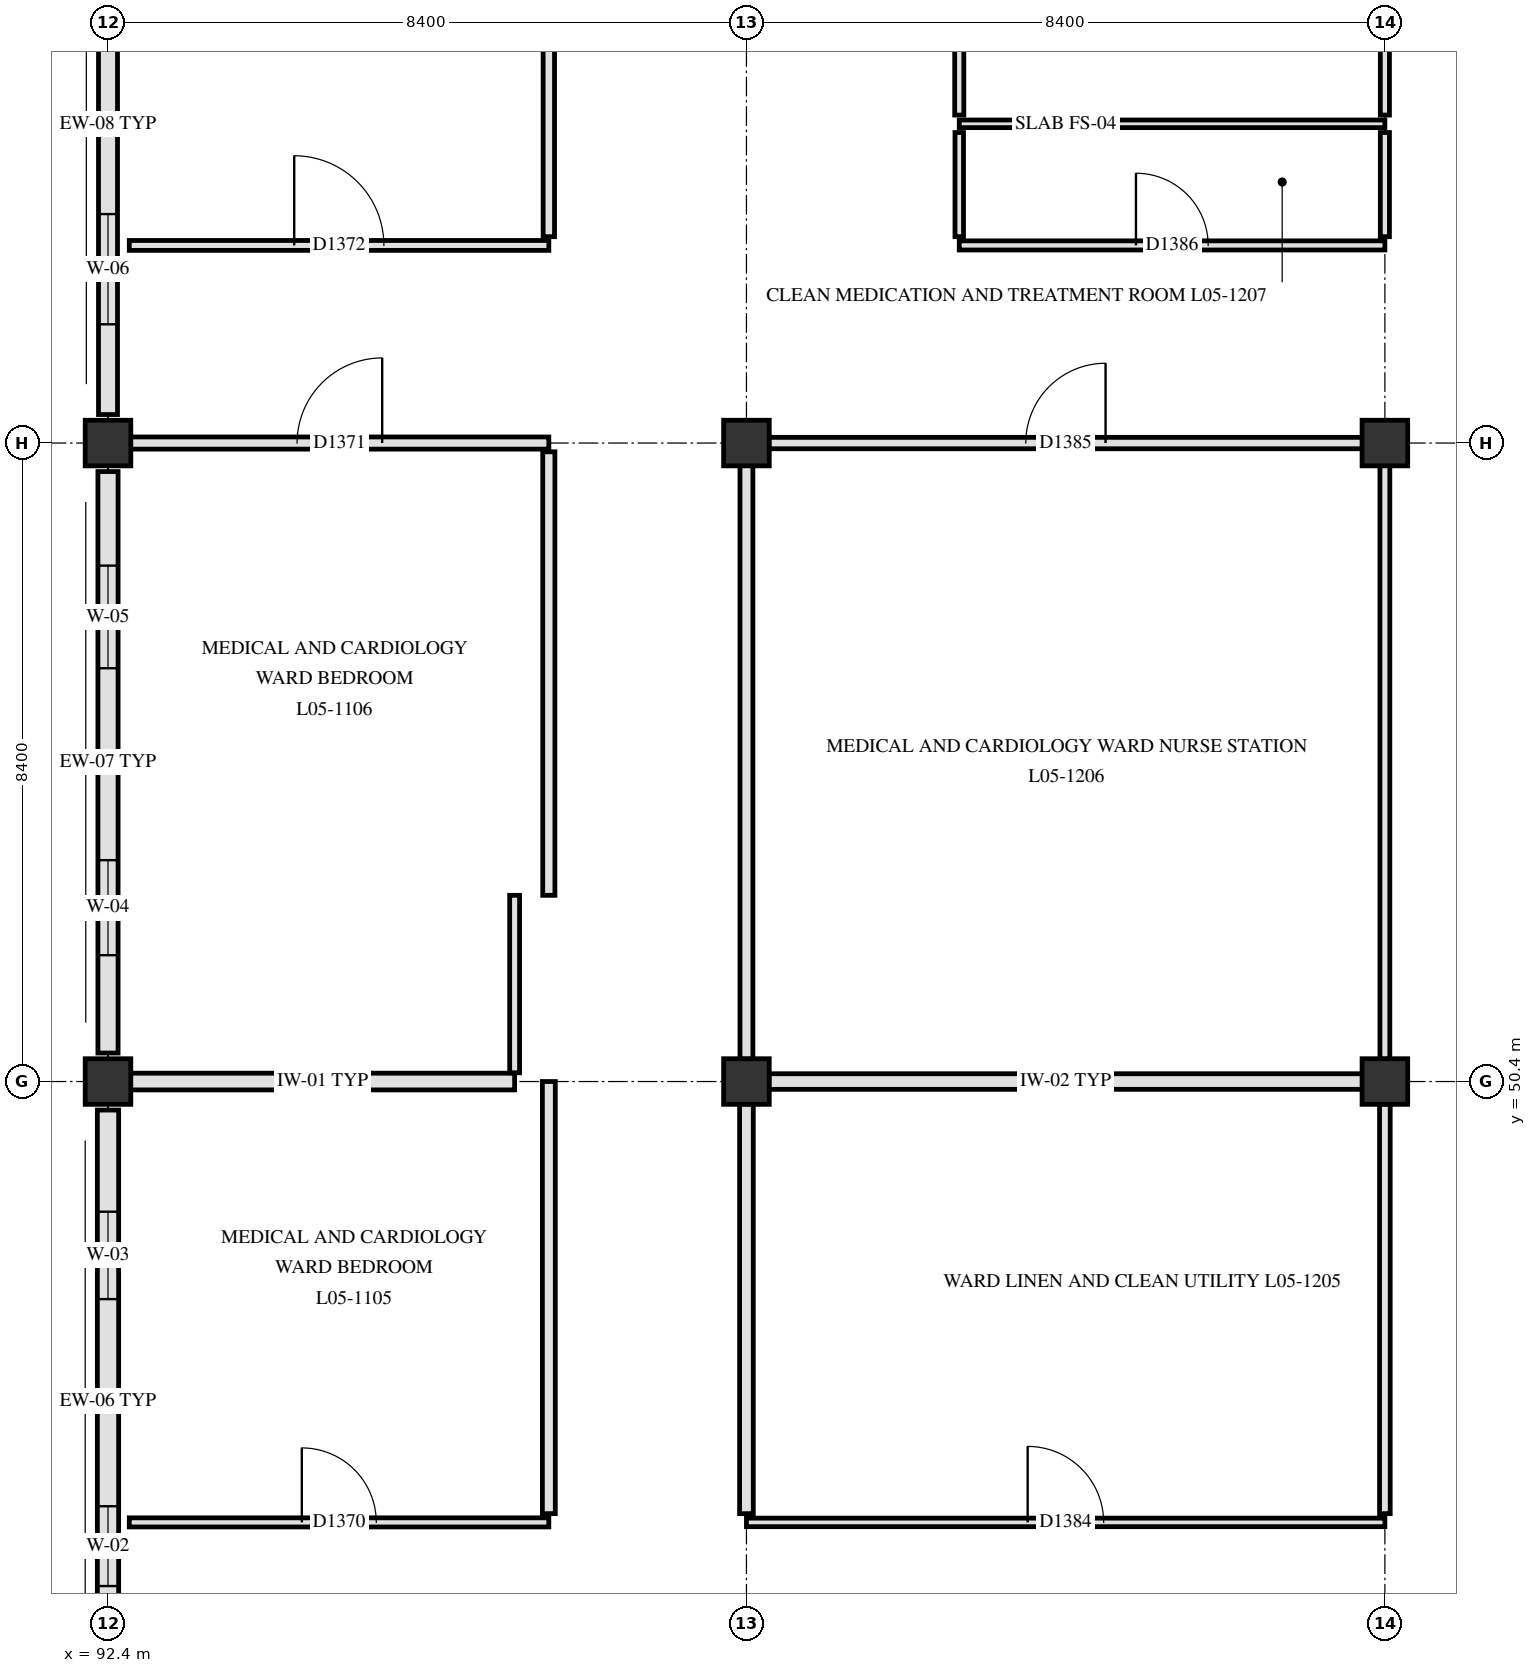
"""IFC4 building model, lengths in metres.
Left out: names, types, materials, properties, quantities, classifications, styles, units other than length and angle.
Written with IfcOpenShell. Run it as: python <this file> out.ifc"""

import sys

from ifc_helpers import new_model, si_unit, direction, frame, frame_2d, origin, origin_2d, place, context, subcontext, project, spatial, rectangle, extrude, element, fill, save


model = new_model("IFC4")
c1 = context("Model", 3, precision=1e-05, world=origin(), true_north=direction((0.0, 1.0)))
c2 = subcontext(c1, "Body", "Model", "MODEL_VIEW")
j1 = project(units=[si_unit("LENGTHUNIT", "METRE"), si_unit("PLANEANGLEUNIT", "RADIAN")], contexts=[c1])
p1 = place(None, origin())
s1 = spatial("IfcSite", under=j1, at=p1, CompositionType="ELEMENT")
p2 = place(p1, origin())
s2 = spatial("IfcBuilding", under=s1, at=p2, CompositionType="ELEMENT")
p3 = place(p2, frame((0.0, 0.0, 22.5)))
s3 = spatial("IfcBuildingStorey", under=s2, at=p3, CompositionType="ELEMENT", Elevation=22.5)
for number, where, z_axis, x_axis in (
    (1, (92.4, 50.4, 0.0), (0.0, 0.0, 1.0), (1.0, 0.0, 0.0)),
    (2, (92.4, 58.8, 0.0), (0.0, 0.0, 1.0), (1.0, 0.0, 0.0)),
    (3, (100.8, 50.4, 0.0), (0.0, 0.0, 1.0), (1.0, 0.0, 0.0)),
    (4, (100.8, 58.8, 0.0), (0.0, 0.0, 1.0), (1.0, 0.0, 0.0)),
    (5, (109.2, 50.4, 0.0), (0.0, 0.0, 1.0), (1.0, 0.0, 0.0)),
    (6, (109.2, 58.8, 0.0), (0.0, 0.0, 1.0), (1.0, 0.0, 0.0)),
):
    element("IfcColumn", number, at=place(p3, frame(where, z_axis=z_axis, x_axis=x_axis)), inside=s3, PredefinedType="COLUMN", context=c2, shape_type="SweptSolid", body=[
        extrude(rectangle(XDim=0.6, YDim=0.6, at=origin_2d()), origin(), (0.0, 0.0, 1.0), 3.9),
    ])
p4 = place(p3, frame((92.4, 42.375, 0.0), z_axis=(0.0, 0.0, 1.0), x_axis=(0.0, 1.0, 0.0)))
e7 = element("IfcWall", 7, at=p4, inside=s3, PredefinedType="SOLIDWALL", context=c2, shape_type="SweptSolid", body=[
    extrude(rectangle(XDim=7.65, YDim=0.28, at=frame_2d((3.825, 0.0))), origin(), (0.0, 0.0, 1.0), 3.34),
])
p5 = place(p4, frame((1.387, 0.0, 0.85)))
e8 = element("IfcOpeningElement", 8, at=p5, cuts=e7, PredefinedType="OPENING", context=c2, shape_type="SweptSolid", body=[
    extrude(rectangle(XDim=1.05, YDim=1.3, at=frame_2d((0.525, 0.65))), frame((0.0, 0.15, 0.0), z_axis=(0.0, -1.0, 0.0), x_axis=(1.0, 0.0, 0.0)), (0.0, 0.0, 1.0), 0.3),
])
p6 = place(p4, frame((5.163, 0.0, 0.85)))
e9 = element("IfcOpeningElement", 9, at=p6, cuts=e7, PredefinedType="OPENING", context=c2, shape_type="SweptSolid", body=[
    extrude(rectangle(XDim=1.15, YDim=1.3, at=frame_2d((0.575, 0.65))), frame((0.0, 0.15, 0.0), z_axis=(0.0, -1.0, 0.0), x_axis=(1.0, 0.0, 0.0)), (0.0, 0.0, 1.0), 0.3),
])
p7 = place(p3, frame((92.4, 50.775, 0.0), z_axis=(0.0, 0.0, 1.0), x_axis=(0.0, 1.0, 0.0)))
e10 = element("IfcWall", 10, at=p7, inside=s3, PredefinedType="SOLIDWALL", context=c2, shape_type="SweptSolid", body=[
    extrude(rectangle(XDim=7.65, YDim=0.265, at=frame_2d((3.825, 0.0))), origin(), (0.0, 0.0, 1.0), 3.38),
])
p8 = place(p7, frame((1.288, 0.0, 0.85)))
e11 = element("IfcOpeningElement", 11, at=p8, cuts=e10, PredefinedType="OPENING", context=c2, shape_type="SweptSolid", body=[
    extrude(rectangle(XDim=1.25, YDim=1.3, at=frame_2d((0.625, 0.65))), frame((0.0, 0.142, 0.0), z_axis=(0.0, -1.0, 0.0), x_axis=(1.0, 0.0, 0.0)), (0.0, 0.0, 1.0), 0.285),
])
p9 = place(p7, frame((5.062, 0.0, 0.85)))
e12 = element("IfcOpeningElement", 12, at=p9, cuts=e10, PredefinedType="OPENING", context=c2, shape_type="SweptSolid", body=[
    extrude(rectangle(XDim=1.35, YDim=1.3, at=frame_2d((0.675, 0.65))), frame((0.0, 0.142, 0.0), z_axis=(0.0, -1.0, 0.0), x_axis=(1.0, 0.0, 0.0)), (0.0, 0.0, 1.0), 0.285),
])
p10 = place(p3, frame((92.4, 59.175, 0.0), z_axis=(0.0, 0.0, 1.0), x_axis=(0.0, 1.0, 0.0)))
e13 = element("IfcWall", 13, at=p10, inside=s3, PredefinedType="SOLIDWALL", context=c2, shape_type="SweptSolid", body=[
    extrude(rectangle(XDim=7.65, YDim=0.25, at=frame_2d((3.825, 0.0))), origin(), (0.0, 0.0, 1.0), 3.38),
])
p11 = place(p10, frame((1.188, 0.0, 0.85)))
e14 = element("IfcOpeningElement", 14, at=p11, cuts=e13, PredefinedType="OPENING", context=c2, shape_type="SweptSolid", body=[
    extrude(rectangle(XDim=1.45, YDim=1.3, at=frame_2d((0.725, 0.65))), frame((0.0, 0.135, 0.0), z_axis=(0.0, -1.0, 0.0), x_axis=(1.0, 0.0, 0.0)), (0.0, 0.0, 1.0), 0.27),
])
p12 = place(p10, frame((4.962, 0.0, 0.85)))
e15 = element("IfcOpeningElement", 15, at=p12, cuts=e13, PredefinedType="OPENING", context=c2, shape_type="SweptSolid", body=[
    extrude(rectangle(XDim=1.55, YDim=1.3, at=frame_2d((0.775, 0.65))), frame((0.0, 0.135, 0.0), z_axis=(0.0, -1.0, 0.0), x_axis=(1.0, 0.0, 0.0)), (0.0, 0.0, 1.0), 0.27),
])
p13 = place(p3, frame((92.68, 44.6, 0.0), z_axis=(0.0, 0.0, 1.0), x_axis=(1.0, 0.0, 0.0)))
e16 = element("IfcWall", 16, at=p13, inside=s3, PredefinedType="PARTITIONING", context=c2, shape_type="SweptSolid", body=[
    extrude(rectangle(XDim=5.52, YDim=0.12, at=frame_2d((2.76, 0.0))), origin(), (0.0, 0.0, 1.0), 3.61),
])
p14 = place(p13, frame((2.27, 0.0, 0.0)))
e17 = element("IfcOpeningElement", 17, at=p14, cuts=e16, PredefinedType="OPENING", context=c2, shape_type="SweptSolid", body=[
    extrude(rectangle(XDim=0.98, YDim=2.12, at=frame_2d((0.49, 1.06))), frame((0.0, 0.07, 0.0), z_axis=(0.0, -1.0, 0.0), x_axis=(1.0, 0.0, 0.0)), (0.0, 0.0, 1.0), 0.14),
])
p15 = place(p3, frame((100.8, 44.6, 0.0), z_axis=(0.0, 0.0, 1.0), x_axis=(1.0, 0.0, 0.0)))
e18 = element("IfcWall", 18, at=p15, inside=s3, PredefinedType="PARTITIONING", context=c2, shape_type="SweptSolid", body=[
    extrude(rectangle(XDim=8.4, YDim=0.112, at=frame_2d((4.2, 0.0))), origin(), (0.0, 0.0, 1.0), 3.3),
])
p16 = place(p15, frame((3.7, 0.0, 0.0)))
e19 = element("IfcOpeningElement", 19, at=p16, cuts=e18, PredefinedType="OPENING", context=c2, shape_type="SweptSolid", body=[
    extrude(rectangle(XDim=1.0, YDim=2.15, at=frame_2d((0.5, 1.075))), frame((0.0, 0.066, 0.0), z_axis=(0.0, -1.0, 0.0), x_axis=(1.0, 0.0, 0.0)), (0.0, 0.0, 1.0), 0.132),
])
p17 = place(p3, frame((92.695, 50.4, 0.0), z_axis=(0.0, 0.0, 1.0), x_axis=(1.0, 0.0, 0.0)))
e20 = element("IfcWall", 20, at=p17, inside=s3, PredefinedType="PARTITIONING", context=c2, shape_type="SweptSolid", body=[
    extrude(rectangle(XDim=5.055, YDim=0.22, at=frame_2d((2.527, 0.0))), origin(), (0.0, 0.0, 1.0), 3.16),
])
p18 = place(p3, frame((101.095, 50.4, 0.0), z_axis=(0.0, 0.0, 1.0), x_axis=(1.0, 0.0, 0.0)))
e21 = element("IfcWall", 21, at=p18, inside=s3, PredefinedType="PARTITIONING", context=c2, shape_type="SweptSolid", body=[
    extrude(rectangle(XDim=7.81, YDim=0.205, at=frame_2d((3.905, 0.0))), origin(), (0.0, 0.0, 1.0), 3.16),
])
p19 = place(p3, frame((92.695, 58.8, 0.0), z_axis=(0.0, 0.0, 1.0), x_axis=(1.0, 0.0, 0.0)))
e22 = element("IfcWall", 22, at=p19, inside=s3, PredefinedType="PARTITIONING", context=c2, shape_type="SweptSolid", body=[
    extrude(rectangle(XDim=5.505, YDim=0.16, at=frame_2d((2.752, 0.0))), origin(), (0.0, 0.0, 1.0), 3.16),
])
p20 = place(p19, frame((2.192, 0.0, 0.0)))
e23 = element("IfcOpeningElement", 23, at=p20, cuts=e22, PredefinedType="OPENING", context=c2, shape_type="SweptSolid", body=[
    extrude(rectangle(XDim=1.12, YDim=2.18, at=frame_2d((0.56, 1.09))), frame((0.0, 0.09, 0.0), z_axis=(0.0, -1.0, 0.0), x_axis=(1.0, 0.0, 0.0)), (0.0, 0.0, 1.0), 0.18),
])
p21 = place(p3, frame((101.095, 58.8, 0.0), z_axis=(0.0, 0.0, 1.0), x_axis=(1.0, 0.0, 0.0)))
e24 = element("IfcWall", 24, at=p21, inside=s3, PredefinedType="PARTITIONING", context=c2, shape_type="SweptSolid", body=[
    extrude(rectangle(XDim=7.81, YDim=0.15, at=frame_2d((3.905, 0.0))), origin(), (0.0, 0.0, 1.0), 3.16),
])
p22 = place(p21, frame((3.38, 0.0, 0.0)))
e25 = element("IfcOpeningElement", 25, at=p22, cuts=e24, PredefinedType="OPENING", context=c2, shape_type="SweptSolid", body=[
    extrude(rectangle(XDim=1.05, YDim=2.15, at=frame_2d((0.525, 1.075))), frame((0.0, 0.085, 0.0), z_axis=(0.0, -1.0, 0.0), x_axis=(1.0, 0.0, 0.0)), (0.0, 0.0, 1.0), 0.17),
])
p23 = place(p3, frame((92.68, 61.4, 0.0), z_axis=(0.0, 0.0, 1.0), x_axis=(1.0, 0.0, 0.0)))
e26 = element("IfcWall", 26, at=p23, inside=s3, PredefinedType="PARTITIONING", context=c2, shape_type="SweptSolid", body=[
    extrude(rectangle(XDim=5.52, YDim=0.13, at=frame_2d((2.76, 0.0))), origin(), (0.0, 0.0, 1.0), 3.61),
])
p24 = place(p23, frame((2.17, 0.0, 0.0)))
e27 = element("IfcOpeningElement", 27, at=p24, cuts=e26, PredefinedType="OPENING", context=c2, shape_type="SweptSolid", body=[
    extrude(rectangle(XDim=1.18, YDim=2.18, at=frame_2d((0.59, 1.09))), frame((0.0, 0.075, 0.0), z_axis=(0.0, -1.0, 0.0), x_axis=(1.0, 0.0, 0.0)), (0.0, 0.0, 1.0), 0.15),
])
p25 = place(p3, frame((103.6, 61.4, 0.0), z_axis=(0.0, 0.0, 1.0), x_axis=(1.0, 0.0, 0.0)))
e28 = element("IfcWall", 28, at=p25, inside=s3, PredefinedType="PARTITIONING", context=c2, shape_type="SweptSolid", body=[
    extrude(rectangle(XDim=5.6, YDim=0.12, at=frame_2d((2.8, 0.0))), origin(), (0.0, 0.0, 1.0), 3.3),
])
p26 = place(p25, frame((2.325, 0.0, 0.0)))
e29 = element("IfcOpeningElement", 29, at=p26, cuts=e28, PredefinedType="OPENING", context=c2, shape_type="SweptSolid", body=[
    extrude(rectangle(XDim=0.95, YDim=2.1, at=frame_2d((0.475, 1.05))), frame((0.0, 0.07, 0.0), z_axis=(0.0, -1.0, 0.0), x_axis=(1.0, 0.0, 0.0)), (0.0, 0.0, 1.0), 0.14),
])
p27 = place(p3, frame((103.6, 63.0, 0.0), z_axis=(0.0, 0.0, 1.0), x_axis=(1.0, 0.0, 0.0)))
e30 = element("IfcWall", 30, at=p27, inside=s3, PredefinedType="PARTITIONING", context=c2, shape_type="SweptSolid", body=[
    extrude(rectangle(XDim=5.6, YDim=0.1, at=frame_2d((2.8, 0.0))), origin(), (0.0, 0.0, 1.0), 3.3),
])
p28 = place(p3, frame((97.75, 50.515, 0.0), z_axis=(0.0, 0.0, 1.0), x_axis=(0.0, 1.0, 0.0)))
e31 = element("IfcWall", 31, at=p28, inside=s3, PredefinedType="PARTITIONING", context=c2, shape_type="SweptSolid", body=[
    extrude(rectangle(XDim=2.335, YDim=0.13, at=frame_2d((1.167, 0.0))), origin(), (0.0, 0.0, 1.0), 3.61),
])
p29 = place(p3, frame((98.2, 44.715, 0.0), z_axis=(0.0, 0.0, 1.0), x_axis=(0.0, 1.0, 0.0)))
e32 = element("IfcWall", 32, at=p29, inside=s3, PredefinedType="PARTITIONING", context=c2, shape_type="SweptSolid", body=[
    extrude(rectangle(XDim=5.685, YDim=0.17, at=frame_2d((2.842, 0.0))), origin(), (0.0, 0.0, 1.0), 3.16),
])
p30 = place(p3, frame((98.2, 52.85, 0.0), z_axis=(0.0, 0.0, 1.0), x_axis=(0.0, 1.0, 0.0)))
e33 = element("IfcWall", 33, at=p30, inside=s3, PredefinedType="PARTITIONING", context=c2, shape_type="SweptSolid", body=[
    extrude(rectangle(XDim=5.835, YDim=0.16, at=frame_2d((2.917, 0.0))), origin(), (0.0, 0.0, 1.0), 3.34),
])
p31 = place(p3, frame((98.2, 61.515, 0.0), z_axis=(0.0, 0.0, 1.0), x_axis=(0.0, 1.0, 0.0)))
e34 = element("IfcWall", 34, at=p31, inside=s3, PredefinedType="PARTITIONING", context=c2, shape_type="SweptSolid", body=[
    extrude(rectangle(XDim=5.685, YDim=0.15, at=frame_2d((2.843, 0.0))), origin(), (0.0, 0.0, 1.0), 3.16),
])
p32 = place(p3, frame((100.8, 44.715, 0.0), z_axis=(0.0, 0.0, 1.0), x_axis=(0.0, 1.0, 0.0)))
e35 = element("IfcWall", 35, at=p32, inside=s3, PredefinedType="PARTITIONING", context=c2, shape_type="SweptSolid", body=[
    extrude(rectangle(XDim=5.39, YDim=0.18, at=frame_2d((2.695, 0.0))), origin(), (0.0, 0.0, 1.0), 3.3),
])
p33 = place(p3, frame((100.8, 50.695, 0.0), z_axis=(0.0, 0.0, 1.0), x_axis=(0.0, 1.0, 0.0)))
e36 = element("IfcWall", 36, at=p33, inside=s3, PredefinedType="PARTITIONING", context=c2, shape_type="SweptSolid", body=[
    extrude(rectangle(XDim=7.81, YDim=0.17, at=frame_2d((3.905, 0.0))), origin(), (0.0, 0.0, 1.0), 3.3),
])
p34 = place(p3, frame((103.6, 61.515, 0.0), z_axis=(0.0, 0.0, 1.0), x_axis=(0.0, 1.0, 0.0)))
e37 = element("IfcWall", 37, at=p34, inside=s3, PredefinedType="PARTITIONING", context=c2, shape_type="SweptSolid", body=[
    extrude(rectangle(XDim=1.37, YDim=0.112, at=frame_2d((0.685, 0.0))), origin(), (0.0, 0.0, 1.0), 3.34),
])
p35 = place(p3, frame((103.6, 63.115, 0.0), z_axis=(0.0, 0.0, 1.0), x_axis=(0.0, 1.0, 0.0)))
e38 = element("IfcWall", 38, at=p35, inside=s3, PredefinedType="PARTITIONING", context=c2, shape_type="SweptSolid", body=[
    extrude(rectangle(XDim=3.97, YDim=0.12, at=frame_2d((1.985, 0.0))), origin(), (0.0, 0.0, 1.0), 3.34),
])
p36 = place(p35, frame((1.51, 0.0, 0.0)))
e39 = element("IfcOpeningElement", 39, at=p36, cuts=e38, PredefinedType="OPENING", context=c2, shape_type="SweptSolid", body=[
    extrude(rectangle(XDim=0.95, YDim=2.1, at=frame_2d((0.475, 1.05))), frame((0.0, 0.07, 0.0), z_axis=(0.0, -1.0, 0.0), x_axis=(1.0, 0.0, 0.0)), (0.0, 0.0, 1.0), 0.14),
])
p37 = place(p3, frame((109.2, 44.715, 0.0), z_axis=(0.0, 0.0, 1.0), x_axis=(0.0, 1.0, 0.0)))
e40 = element("IfcWall", 40, at=p37, inside=s3, PredefinedType="PARTITIONING", context=c2, shape_type="SweptSolid", body=[
    extrude(rectangle(XDim=5.39, YDim=0.14, at=frame_2d((2.695, 0.0))), origin(), (0.0, 0.0, 1.0), 3.3),
])
p38 = place(p3, frame((109.2, 50.695, 0.0), z_axis=(0.0, 0.0, 1.0), x_axis=(0.0, 1.0, 0.0)))
e41 = element("IfcWall", 41, at=p38, inside=s3, PredefinedType="PARTITIONING", context=c2, shape_type="SweptSolid", body=[
    extrude(rectangle(XDim=7.81, YDim=0.13, at=frame_2d((3.905, 0.0))), origin(), (0.0, 0.0, 1.0), 3.3),
])
p39 = place(p3, frame((109.2, 61.515, 0.0), z_axis=(0.0, 0.0, 1.0), x_axis=(0.0, 1.0, 0.0)))
e42 = element("IfcWall", 42, at=p39, inside=s3, PredefinedType="PARTITIONING", context=c2, shape_type="SweptSolid", body=[
    extrude(rectangle(XDim=1.37, YDim=0.12, at=frame_2d((0.685, 0.0))), origin(), (0.0, 0.0, 1.0), 3.3),
])
p40 = place(p3, frame((109.2, 63.115, 0.0), z_axis=(0.0, 0.0, 1.0), x_axis=(0.0, 1.0, 0.0)))
e43 = element("IfcWall", 43, at=p40, inside=s3, PredefinedType="PARTITIONING", context=c2, shape_type="SweptSolid", body=[
    extrude(rectangle(XDim=3.79, YDim=0.12, at=frame_2d((1.895, 0.0))), origin(), (0.0, 0.0, 1.0), 3.3),
])
p41 = place(p5, origin())
e44 = element("IfcWindow", 44, at=p41, inside=s3, PartitioningType="SINGLE_PANEL", PredefinedType="WINDOW", context=c2, shape_type="SweptSolid", body=[
    extrude(rectangle(XDim=1.05, YDim=1.3, at=frame_2d((0.525, 0.65))), frame((0.0, 0.03, 0.0), z_axis=(0.0, -1.0, 0.0), x_axis=(1.0, 0.0, 0.0)), (0.0, 0.0, 1.0), 0.06),
])
fill(e8, e44)
p42 = place(p6, origin())
e45 = element("IfcWindow", 45, at=p42, inside=s3, PartitioningType="SINGLE_PANEL", PredefinedType="WINDOW", context=c2, shape_type="SweptSolid", body=[
    extrude(rectangle(XDim=1.15, YDim=1.3, at=frame_2d((0.575, 0.65))), frame((0.0, 0.03, 0.0), z_axis=(0.0, -1.0, 0.0), x_axis=(1.0, 0.0, 0.0)), (0.0, 0.0, 1.0), 0.06),
])
fill(e9, e45)
p43 = place(p8, origin())
e46 = element("IfcWindow", 46, at=p43, inside=s3, PartitioningType="SINGLE_PANEL", PredefinedType="WINDOW", context=c2, shape_type="SweptSolid", body=[
    extrude(rectangle(XDim=1.25, YDim=1.3, at=frame_2d((0.625, 0.65))), frame((0.0, 0.03, 0.0), z_axis=(0.0, -1.0, 0.0), x_axis=(1.0, 0.0, 0.0)), (0.0, 0.0, 1.0), 0.06),
])
fill(e11, e46)
p44 = place(p9, origin())
e47 = element("IfcWindow", 47, at=p44, inside=s3, PartitioningType="SINGLE_PANEL", PredefinedType="WINDOW", context=c2, shape_type="SweptSolid", body=[
    extrude(rectangle(XDim=1.35, YDim=1.3, at=frame_2d((0.675, 0.65))), frame((0.0, 0.03, 0.0), z_axis=(0.0, -1.0, 0.0), x_axis=(1.0, 0.0, 0.0)), (0.0, 0.0, 1.0), 0.06),
])
fill(e12, e47)
p45 = place(p11, origin())
e48 = element("IfcWindow", 48, at=p45, inside=s3, PartitioningType="SINGLE_PANEL", PredefinedType="WINDOW", context=c2, shape_type="SweptSolid", body=[
    extrude(rectangle(XDim=1.45, YDim=1.3, at=frame_2d((0.725, 0.65))), frame((0.0, 0.03, 0.0), z_axis=(0.0, -1.0, 0.0), x_axis=(1.0, 0.0, 0.0)), (0.0, 0.0, 1.0), 0.06),
])
fill(e14, e48)
p46 = place(p14, origin())
e49 = element("IfcDoor", 49, at=p46, inside=s3, OperationType="SINGLE_SWING_LEFT", PredefinedType="DOOR", context=c2, shape_type="SweptSolid", body=[
    extrude(rectangle(XDim=0.98, YDim=2.12, at=frame_2d((0.49, 1.06))), frame((0.0, 0.025, 0.0), z_axis=(0.0, -1.0, 0.0), x_axis=(1.0, 0.0, 0.0)), (0.0, 0.0, 1.0), 0.05),
])
fill(e17, e49)
p47 = place(p20, origin())
e50 = element("IfcDoor", 50, at=p47, inside=s3, OperationType="SINGLE_SWING_RIGHT", PredefinedType="DOOR", context=c2, shape_type="SweptSolid", body=[
    extrude(rectangle(XDim=1.12, YDim=2.18, at=frame_2d((0.56, 1.09))), frame((0.0, 0.025, 0.0), z_axis=(0.0, -1.0, 0.0), x_axis=(1.0, 0.0, 0.0)), (0.0, 0.0, 1.0), 0.05),
])
fill(e23, e50)
p48 = place(p24, origin())
e51 = element("IfcDoor", 51, at=p48, inside=s3, OperationType="SINGLE_SWING_LEFT", PredefinedType="DOOR", context=c2, shape_type="SweptSolid", body=[
    extrude(rectangle(XDim=1.18, YDim=2.18, at=frame_2d((0.59, 1.09))), frame((0.0, 0.025, 0.0), z_axis=(0.0, -1.0, 0.0), x_axis=(1.0, 0.0, 0.0)), (0.0, 0.0, 1.0), 0.05),
])
fill(e27, e51)
p49 = place(p16, origin())
e52 = element("IfcDoor", 52, at=p49, inside=s3, OperationType="SINGLE_SWING_LEFT", PredefinedType="DOOR", context=c2, shape_type="SweptSolid", body=[
    extrude(rectangle(XDim=1.0, YDim=2.15, at=frame_2d((0.5, 1.075))), frame((0.0, 0.025, 0.0), z_axis=(0.0, -1.0, 0.0), x_axis=(1.0, 0.0, 0.0)), (0.0, 0.0, 1.0), 0.05),
])
fill(e19, e52)
p50 = place(p22, origin())
e53 = element("IfcDoor", 53, at=p50, inside=s3, OperationType="SINGLE_SWING_RIGHT", PredefinedType="DOOR", context=c2, shape_type="SweptSolid", body=[
    extrude(rectangle(XDim=1.05, YDim=2.15, at=frame_2d((0.525, 1.075))), frame((0.0, 0.025, 0.0), z_axis=(0.0, -1.0, 0.0), x_axis=(1.0, 0.0, 0.0)), (0.0, 0.0, 1.0), 0.05),
])
fill(e25, e53)
p51 = place(p26, origin())
e54 = element("IfcDoor", 54, at=p51, inside=s3, OperationType="SINGLE_SWING_LEFT", PredefinedType="DOOR", context=c2, shape_type="SweptSolid", body=[
    extrude(rectangle(XDim=0.95, YDim=2.1, at=frame_2d((0.475, 1.05))), frame((0.0, 0.025, 0.0), z_axis=(0.0, -1.0, 0.0), x_axis=(1.0, 0.0, 0.0)), (0.0, 0.0, 1.0), 0.05),
])
fill(e29, e54)
save(model, sys.argv[1])
